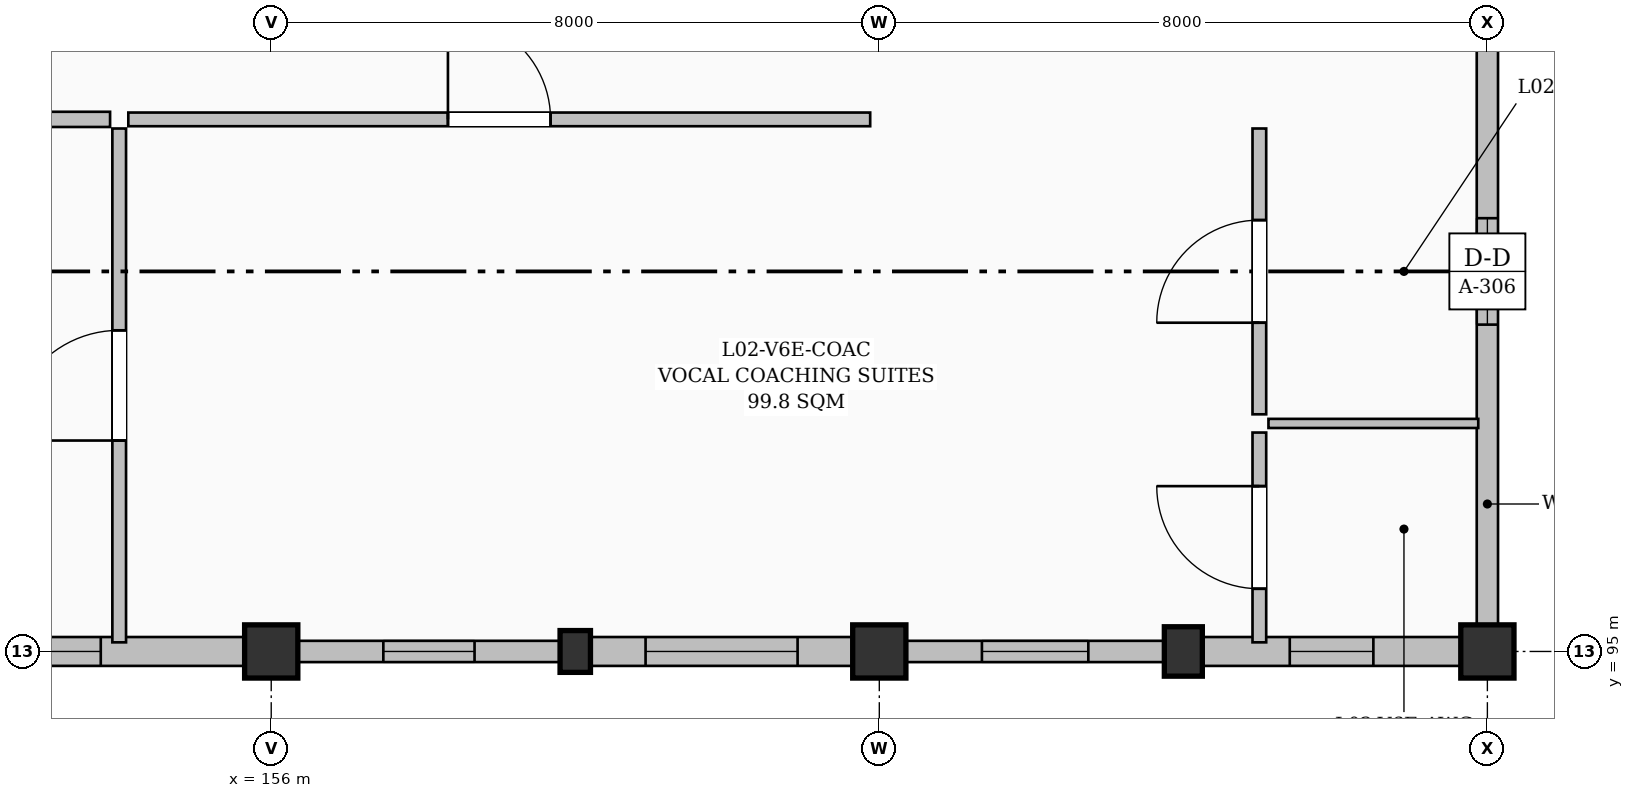
"""IFC4 building model, lengths in metres.
Left out: names, types, materials, properties, quantities, classifications, styles, units other than length and angle.
Written with IfcOpenShell. Run it as: python <this file> out.ifc"""

import sys

from ifc_helpers import new_model, si_unit, direction, frame, frame_2d, origin, origin_2d, place, context, subcontext, project, spatial, rectangle, extrude, element, fill, save


model = new_model("IFC4")
c1 = context("Model", 3, precision=1e-05, world=origin(), true_north=direction((0.0, 1.0)))
c2 = subcontext(c1, "Body", "Model", "MODEL_VIEW")
j1 = project(units=[si_unit("LENGTHUNIT", "METRE"), si_unit("PLANEANGLEUNIT", "RADIAN")], contexts=[c1])
p1 = place(None, origin())
s1 = spatial("IfcSite", under=j1, at=p1, CompositionType="ELEMENT")
p2 = place(p1, origin())
s2 = spatial("IfcBuilding", under=s1, at=p2, CompositionType="ELEMENT")
p3 = place(p2, frame((0.0, 0.0, 9.3)))
s3 = spatial("IfcBuildingStorey", under=s2, at=p3, CompositionType="ELEMENT", Elevation=9.3)
p4 = place(p3, frame((156.0, 95.0, 0.0), z_axis=(0.0, 0.0, 1.0), x_axis=(1.0, 0.0, 0.0)))
e1 = element("IfcColumn", 1, at=p4, inside=s3, PredefinedType="COLUMN", context=c2, shape_type="SweptSolid", body=[
    extrude(rectangle(XDim=0.7, YDim=0.7, at=origin_2d()), origin(), (0.0, 0.0, 1.0), 4.5),
])
p5 = place(p3, frame((160.0, 95.0, 0.0), z_axis=(0.0, 0.0, 1.0), x_axis=(1.0, 0.0, 0.0)))
e2 = element("IfcColumn", 2, at=p5, inside=s3, PredefinedType="PILASTER", context=c2, shape_type="SweptSolid", body=[
    extrude(rectangle(XDim=0.4, YDim=0.55, at=origin_2d()), origin(), (0.0, 0.0, 1.0), 4.5),
])
p6 = place(p3, frame((164.0, 95.0, 0.0), z_axis=(0.0, 0.0, 1.0), x_axis=(1.0, 0.0, 0.0)))
e3 = element("IfcColumn", 3, at=p6, inside=s3, PredefinedType="COLUMN", context=c2, shape_type="SweptSolid", body=[
    extrude(rectangle(XDim=0.7, YDim=0.7, at=origin_2d()), origin(), (0.0, 0.0, 1.0), 4.5),
])
p7 = place(p3, frame((168.0, 95.0, 0.0), z_axis=(0.0, 0.0, 1.0), x_axis=(1.0, 0.0, 0.0)))
e4 = element("IfcColumn", 4, at=p7, inside=s3, PredefinedType="PILASTER", context=c2, shape_type="SweptSolid", body=[
    extrude(rectangle(XDim=0.5, YDim=0.65, at=origin_2d()), origin(), (0.0, 0.0, 1.0), 4.5),
])
p8 = place(p3, frame((172.0, 95.0, 0.0), z_axis=(0.0, 0.0, 1.0), x_axis=(1.0, 0.0, 0.0)))
e5 = element("IfcColumn", 5, at=p8, inside=s3, PredefinedType="COLUMN", context=c2, shape_type="SweptSolid", body=[
    extrude(rectangle(XDim=0.7, YDim=0.7, at=origin_2d()), origin(), (0.0, 0.0, 1.0), 4.5),
])
p9 = place(p3, frame((172.0, 104.65, 0.0), z_axis=(0.0, 0.0, 1.0), x_axis=(0.0, -1.0, 0.0)))
e6 = element("IfcWall", 6, at=p9, inside=s3, PredefinedType="SOLIDWALL", context=c2, shape_type="SweptSolid", body=[
    extrude(rectangle(XDim=9.3, YDim=0.28, at=frame_2d((4.65, 0.0))), origin(), (0.0, 0.0, 1.0), 3.655),
])
p10 = place(p9, frame((3.95, 0.0, 0.95)))
e7 = element("IfcOpeningElement", 7, at=p10, cuts=e6, PredefinedType="OPENING", context=c2, shape_type="SweptSolid", body=[
    extrude(rectangle(XDim=1.4, YDim=1.8, at=frame_2d((0.7, 0.9))), frame((0.0, 0.15, 0.0), z_axis=(0.0, -1.0, 0.0), x_axis=(1.0, 0.0, 0.0)), (0.0, 0.0, 1.0), 0.3),
])
p11 = place(p3, frame((171.65, 95.0, 0.0), z_axis=(0.0, 0.0, 1.0), x_axis=(-1.0, 0.0, 0.0)))
e8 = element("IfcWall", 8, at=p11, inside=s3, PredefinedType="SOLIDWALL", context=c2, shape_type="SweptSolid", body=[
    extrude(rectangle(XDim=3.4, YDim=0.38, at=frame_2d((1.7, 0.0))), origin(), (0.0, 0.0, 1.0), 3.655),
])
p12 = place(p11, frame((1.15, 0.0, 0.95)))
e9 = element("IfcOpeningElement", 9, at=p12, cuts=e8, PredefinedType="OPENING", context=c2, shape_type="SweptSolid", body=[
    extrude(rectangle(XDim=1.1, YDim=2.0, at=frame_2d((0.55, 1.0))), frame((0.0, 0.2, 0.0), z_axis=(0.0, -1.0, 0.0), x_axis=(1.0, 0.0, 0.0)), (0.0, 0.0, 1.0), 0.4),
])
p13 = place(p3, frame((167.75, 95.0, 0.0), z_axis=(0.0, 0.0, 1.0), x_axis=(-1.0, 0.0, 0.0)))
e10 = element("IfcWall", 10, at=p13, inside=s3, PredefinedType="SOLIDWALL", context=c2, shape_type="SweptSolid", body=[
    extrude(rectangle(XDim=3.4, YDim=0.28, at=frame_2d((1.7, 0.0))), origin(), (0.0, 0.0, 1.0), 3.655),
])
p14 = place(p13, frame((1.0, 0.0, 0.95)))
e11 = element("IfcOpeningElement", 11, at=p14, cuts=e10, PredefinedType="OPENING", context=c2, shape_type="SweptSolid", body=[
    extrude(rectangle(XDim=1.4, YDim=1.8, at=frame_2d((0.7, 0.9))), frame((0.0, 0.15, 0.0), z_axis=(0.0, -1.0, 0.0), x_axis=(1.0, 0.0, 0.0)), (0.0, 0.0, 1.0), 0.3),
])
p15 = place(p3, frame((163.65, 95.0, 0.0), z_axis=(0.0, 0.0, 1.0), x_axis=(-1.0, 0.0, 0.0)))
e12 = element("IfcWall", 12, at=p15, inside=s3, PredefinedType="SOLIDWALL", context=c2, shape_type="SweptSolid", body=[
    extrude(rectangle(XDim=3.45, YDim=0.38, at=frame_2d((1.725, 0.0))), origin(), (0.0, 0.0, 1.0), 3.705),
])
p16 = place(p15, frame((0.725, 0.0, 0.95)))
e13 = element("IfcOpeningElement", 13, at=p16, cuts=e12, PredefinedType="OPENING", context=c2, shape_type="SweptSolid", body=[
    extrude(rectangle(XDim=2.0, YDim=1.8, at=frame_2d((1.0, 0.9))), frame((0.0, 0.2, 0.0), z_axis=(0.0, -1.0, 0.0), x_axis=(1.0, 0.0, 0.0)), (0.0, 0.0, 1.0), 0.4),
])
p17 = place(p3, frame((159.8, 95.0, 0.0), z_axis=(0.0, 0.0, 1.0), x_axis=(-1.0, 0.0, 0.0)))
e14 = element("IfcWall", 14, at=p17, inside=s3, PredefinedType="SOLIDWALL", context=c2, shape_type="SweptSolid", body=[
    extrude(rectangle(XDim=3.45, YDim=0.28, at=frame_2d((1.725, 0.0))), origin(), (0.0, 0.0, 1.0), 3.705),
])
p18 = place(p17, frame((1.125, 0.0, 0.95)))
e15 = element("IfcOpeningElement", 15, at=p18, cuts=e14, PredefinedType="OPENING", context=c2, shape_type="SweptSolid", body=[
    extrude(rectangle(XDim=1.2, YDim=1.5, at=frame_2d((0.6, 0.75))), frame((0.0, 0.15, 0.0), z_axis=(0.0, -1.0, 0.0), x_axis=(1.0, 0.0, 0.0)), (0.0, 0.0, 1.0), 0.3),
])
p19 = place(p3, frame((155.65, 95.0, 0.0), z_axis=(0.0, 0.0, 1.0), x_axis=(-1.0, 0.0, 0.0)))
e16 = element("IfcWall", 16, at=p19, inside=s3, PredefinedType="SOLIDWALL", context=c2, shape_type="SweptSolid", body=[
    extrude(rectangle(XDim=3.425, YDim=0.38, at=frame_2d((1.712, 0.0))), origin(), (0.0, 0.0, 1.0), 3.755),
])
p20 = place(p19, frame((1.893, 0.0, 0.95)))
e17 = element("IfcOpeningElement", 17, at=p20, cuts=e16, PredefinedType="OPENING", context=c2, shape_type="SweptSolid", body=[
    extrude(rectangle(XDim=1.3, YDim=1.4, at=frame_2d((0.65, 0.7))), frame((0.0, 0.2, 0.0), z_axis=(0.0, -1.0, 0.0), x_axis=(1.0, 0.0, 0.0)), (0.0, 0.0, 1.0), 0.4),
])
p21 = place(p3, frame((154.0, 95.12, 0.0), z_axis=(0.0, 0.0, 1.0), x_axis=(0.0, 1.0, 0.0)))
e18 = element("IfcWall", 18, at=p21, inside=s3, PredefinedType="PARTITIONING", context=c2, shape_type="SweptSolid", body=[
    extrude(rectangle(XDim=6.76, YDim=0.18, at=frame_2d((3.38, 0.0))), origin(), (0.0, 0.0, 1.0), 4.27),
])
p22 = place(p21, frame((2.655, 0.0, 0.0)))
e19 = element("IfcOpeningElement", 19, at=p22, cuts=e18, PredefinedType="OPENING", context=c2, shape_type="SweptSolid", body=[
    extrude(rectangle(XDim=1.45, YDim=2.25, at=frame_2d((0.725, 1.125))), frame((0.0, 0.1, 0.0), z_axis=(0.0, -1.0, 0.0), x_axis=(1.0, 0.0, 0.0)), (0.0, 0.0, 1.0), 0.2),
])
p23 = place(p3, frame((140.12, 102.0, 0.0), z_axis=(0.0, 0.0, 1.0), x_axis=(1.0, 0.0, 0.0)))
e20 = element("IfcWall", 20, at=p23, inside=s3, PredefinedType="PARTITIONING", context=c2, shape_type="SweptSolid", body=[
    extrude(rectangle(XDim=13.76, YDim=0.2, at=frame_2d((6.88, 0.0))), origin(), (0.0, 0.0, 1.0), 3.925),
])
p24 = place(p23, frame((6.155, 0.0, 0.0)))
e21 = element("IfcOpeningElement", 21, at=p24, cuts=e20, PredefinedType="OPENING", context=c2, shape_type="SweptSolid", body=[
    extrude(rectangle(XDim=1.45, YDim=2.25, at=frame_2d((0.725, 1.125))), frame((0.0, 0.11, 0.0), z_axis=(0.0, -1.0, 0.0), x_axis=(1.0, 0.0, 0.0)), (0.0, 0.0, 1.0), 0.22),
])
p25 = place(p3, frame((154.12, 102.0, 0.0), z_axis=(0.0, 0.0, 1.0), x_axis=(1.0, 0.0, 0.0)))
e22 = element("IfcWall", 22, at=p25, inside=s3, PredefinedType="PARTITIONING", context=c2, shape_type="SweptSolid", body=[
    extrude(rectangle(XDim=9.76, YDim=0.18, at=frame_2d((4.88, 0.0))), origin(), (0.0, 0.0, 1.0), 3.925),
])
p26 = place(p25, frame((4.205, 0.0, 0.0)))
e23 = element("IfcOpeningElement", 23, at=p26, cuts=e22, PredefinedType="OPENING", context=c2, shape_type="SweptSolid", body=[
    extrude(rectangle(XDim=1.35, YDim=2.2, at=frame_2d((0.675, 1.1))), frame((0.0, 0.1, 0.0), z_axis=(0.0, -1.0, 0.0), x_axis=(1.0, 0.0, 0.0)), (0.0, 0.0, 1.0), 0.2),
])
p27 = place(p3, frame((169.0, 95.12, 0.0), z_axis=(0.0, 0.0, 1.0), x_axis=(0.0, 1.0, 0.0)))
e24 = element("IfcWall", 24, at=p27, inside=s3, PredefinedType="PARTITIONING", context=c2, shape_type="SweptSolid", body=[
    extrude(rectangle(XDim=2.76, YDim=0.18, at=frame_2d((1.38, 0.0))), origin(), (0.0, 0.0, 1.0), 4.27),
])
p28 = place(p27, frame((0.705, 0.0, 0.0)))
e25 = element("IfcOpeningElement", 25, at=p28, cuts=e24, PredefinedType="OPENING", context=c2, shape_type="SweptSolid", body=[
    extrude(rectangle(XDim=1.35, YDim=2.2, at=frame_2d((0.675, 1.1))), frame((0.0, 0.1, 0.0), z_axis=(0.0, -1.0, 0.0), x_axis=(1.0, 0.0, 0.0)), (0.0, 0.0, 1.0), 0.2),
])
p29 = place(p3, frame((169.0, 98.12, 0.0), z_axis=(0.0, 0.0, 1.0), x_axis=(0.0, 1.0, 0.0)))
e26 = element("IfcWall", 26, at=p29, inside=s3, PredefinedType="PARTITIONING", context=c2, shape_type="SweptSolid", body=[
    extrude(rectangle(XDim=3.76, YDim=0.18, at=frame_2d((1.88, 0.0))), origin(), (0.0, 0.0, 1.0), 4.27),
])
p30 = place(p29, frame((1.205, 0.0, 0.0)))
e27 = element("IfcOpeningElement", 27, at=p30, cuts=e26, PredefinedType="OPENING", context=c2, shape_type="SweptSolid", body=[
    extrude(rectangle(XDim=1.35, YDim=2.2, at=frame_2d((0.675, 1.1))), frame((0.0, 0.1, 0.0), z_axis=(0.0, -1.0, 0.0), x_axis=(1.0, 0.0, 0.0)), (0.0, 0.0, 1.0), 0.2),
])
p31 = place(p3, frame((169.12, 98.0, 0.0), z_axis=(0.0, 0.0, 1.0), x_axis=(1.0, 0.0, 0.0)))
e28 = element("IfcWall", 28, at=p31, inside=s3, PredefinedType="PARTITIONING", context=c2, shape_type="SweptSolid", body=[
    extrude(rectangle(XDim=2.76, YDim=0.12, at=frame_2d((1.38, 0.0))), origin(), (0.0, 0.0, 1.0), 3.955),
])
p32 = place(p10, origin())
e29 = element("IfcWindow", 29, at=p32, inside=s3, PartitioningType="DOUBLE_PANEL_VERTICAL", PredefinedType="WINDOW", context=c2, shape_type="SweptSolid", body=[
    extrude(rectangle(XDim=1.4, YDim=1.8, at=frame_2d((0.7, 0.9))), frame((0.0, 0.03, 0.0), z_axis=(0.0, -1.0, 0.0), x_axis=(1.0, 0.0, 0.0)), (0.0, 0.0, 1.0), 0.06),
])
fill(e7, e29)
p33 = place(p12, origin())
e30 = element("IfcWindow", 30, at=p33, inside=s3, PartitioningType="SINGLE_PANEL", PredefinedType="WINDOW", context=c2, shape_type="SweptSolid", body=[
    extrude(rectangle(XDim=1.1, YDim=2.0, at=frame_2d((0.55, 1.0))), frame((0.0, 0.03, 0.0), z_axis=(0.0, -1.0, 0.0), x_axis=(1.0, 0.0, 0.0)), (0.0, 0.0, 1.0), 0.06),
])
fill(e9, e30)
p34 = place(p14, origin())
e31 = element("IfcWindow", 31, at=p34, inside=s3, PartitioningType="DOUBLE_PANEL_VERTICAL", PredefinedType="WINDOW", context=c2, shape_type="SweptSolid", body=[
    extrude(rectangle(XDim=1.4, YDim=1.8, at=frame_2d((0.7, 0.9))), frame((0.0, 0.03, 0.0), z_axis=(0.0, -1.0, 0.0), x_axis=(1.0, 0.0, 0.0)), (0.0, 0.0, 1.0), 0.06),
])
fill(e11, e31)
p35 = place(p16, origin())
e32 = element("IfcWindow", 32, at=p35, inside=s3, PartitioningType="TRIPLE_PANEL_VERTICAL", PredefinedType="WINDOW", context=c2, shape_type="SweptSolid", body=[
    extrude(rectangle(XDim=2.0, YDim=1.8, at=frame_2d((1.0, 0.9))), frame((0.0, 0.03, 0.0), z_axis=(0.0, -1.0, 0.0), x_axis=(1.0, 0.0, 0.0)), (0.0, 0.0, 1.0), 0.06),
])
fill(e13, e32)
p36 = place(p18, origin())
e33 = element("IfcWindow", 33, at=p36, inside=s3, PartitioningType="SINGLE_PANEL", PredefinedType="WINDOW", context=c2, shape_type="SweptSolid", body=[
    extrude(rectangle(XDim=1.2, YDim=1.5, at=frame_2d((0.6, 0.75))), frame((0.0, 0.03, 0.0), z_axis=(0.0, -1.0, 0.0), x_axis=(1.0, 0.0, 0.0)), (0.0, 0.0, 1.0), 0.06),
])
fill(e15, e33)
p37 = place(p20, origin())
e34 = element("IfcWindow", 34, at=p37, inside=s3, PartitioningType="TRIPLE_PANEL_VERTICAL", PredefinedType="WINDOW", context=c2, shape_type="SweptSolid", body=[
    extrude(rectangle(XDim=1.3, YDim=1.4, at=frame_2d((0.65, 0.7))), frame((0.0, 0.03, 0.0), z_axis=(0.0, -1.0, 0.0), x_axis=(1.0, 0.0, 0.0)), (0.0, 0.0, 1.0), 0.06),
])
fill(e17, e34)
p38 = place(p22, origin())
e35 = element("IfcDoor", 35, at=p38, inside=s3, OperationType="SINGLE_SWING_LEFT", PredefinedType="DOOR", context=c2, shape_type="SweptSolid", body=[
    extrude(rectangle(XDim=1.45, YDim=2.25, at=frame_2d((0.725, 1.125))), frame((0.0, 0.025, 0.0), z_axis=(0.0, -1.0, 0.0), x_axis=(1.0, 0.0, 0.0)), (0.0, 0.0, 1.0), 0.05),
])
fill(e19, e35)
p39 = place(p26, origin())
e36 = element("IfcDoor", 36, at=p39, inside=s3, OperationType="SINGLE_SWING_LEFT", PredefinedType="DOOR", context=c2, shape_type="SweptSolid", body=[
    extrude(rectangle(XDim=1.35, YDim=2.2, at=frame_2d((0.675, 1.1))), frame((0.0, 0.025, 0.0), z_axis=(0.0, -1.0, 0.0), x_axis=(1.0, 0.0, 0.0)), (0.0, 0.0, 1.0), 0.05),
])
fill(e23, e36)
p40 = place(p28, origin())
e37 = element("IfcDoor", 37, at=p40, inside=s3, OperationType="SINGLE_SWING_RIGHT", PredefinedType="DOOR", context=c2, shape_type="SweptSolid", body=[
    extrude(rectangle(XDim=1.35, YDim=2.2, at=frame_2d((0.675, 1.1))), frame((0.0, 0.025, 0.0), z_axis=(0.0, -1.0, 0.0), x_axis=(1.0, 0.0, 0.0)), (0.0, 0.0, 1.0), 0.05),
])
fill(e25, e37)
p41 = place(p30, origin())
e38 = element("IfcDoor", 38, at=p41, inside=s3, OperationType="SINGLE_SWING_LEFT", PredefinedType="DOOR", context=c2, shape_type="SweptSolid", body=[
    extrude(rectangle(XDim=1.35, YDim=2.2, at=frame_2d((0.675, 1.1))), frame((0.0, 0.025, 0.0), z_axis=(0.0, -1.0, 0.0), x_axis=(1.0, 0.0, 0.0)), (0.0, 0.0, 1.0), 0.05),
])
fill(e27, e38)
save(model, sys.argv[1])
